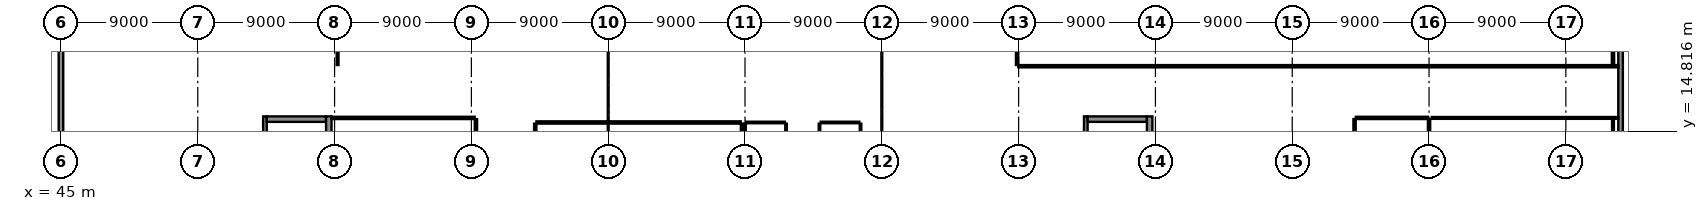
"""IFC4 building model, lengths in metres.
Left out: names, types, materials, properties, quantities, classifications, styles, units other than length and angle.
Written with IfcOpenShell. Run it as: python <this file> out.ifc"""

import sys

from ifc_helpers import new_model, si_unit, direction, frame, frame_2d, origin, place, context, subcontext, project, spatial, rectangle, extrude, element, fill, save


model = new_model("IFC4")
c1 = context("Model", 3, precision=1e-05, world=origin(), true_north=direction((0.0, 1.0)))
c2 = subcontext(c1, "Body", "Model", "MODEL_VIEW")
j1 = project(units=[si_unit("LENGTHUNIT", "METRE"), si_unit("PLANEANGLEUNIT", "RADIAN")], contexts=[c1])
p1 = place(None, origin())
s1 = spatial("IfcSite", under=j1, at=p1, CompositionType="ELEMENT")
p2 = place(p1, origin())
s2 = spatial("IfcBuilding", under=s1, at=p2, CompositionType="ELEMENT")
p3 = place(p2, frame((0.0, 0.0, 14.4)))
s3 = spatial("IfcBuildingStorey", under=s2, at=p3, CompositionType="ELEMENT", Elevation=14.4)
p4 = place(p3, frame((45.0, 23.644, 0.0), z_axis=(0.0, 0.0, 1.0), x_axis=(0.0, -1.0, 0.0)))
e1 = element("IfcWall", 1, at=p4, inside=s3, PredefinedType="SOLIDWALL", context=c2, shape_type="SweptSolid", body=[
    extrude(rectangle(XDim=11.336, YDim=0.3, at=frame_2d((5.668, 0.0))), origin(), (0.0, 0.0, 1.0), 3.685),
])
p5 = place(p4, frame((5.444, 0.0, 0.0)))
e2 = element("IfcOpeningElement", 2, at=p5, cuts=e1, PredefinedType="OPENING", context=c2, shape_type="SweptSolid", body=[
    extrude(rectangle(XDim=1.4, YDim=2.3, at=frame_2d((0.7, 1.15))), frame((0.0, 0.165, 0.0), z_axis=(0.0, -1.0, 0.0), x_axis=(1.0, 0.0, 0.0)), (0.0, 0.0, 1.0), 0.33),
])
p6 = place(p3, frame((147.6, 11.99, 0.0), z_axis=(0.0, 0.0, 1.0), x_axis=(0.0, 1.0, 0.0)))
e3 = element("IfcWall", 3, at=p6, inside=s3, PredefinedType="SOLIDWALL", context=c2, shape_type="SweptSolid", body=[
    extrude(rectangle(XDim=12.05, YDim=0.3, at=frame_2d((6.025, 0.0))), origin(), (0.0, 0.0, 1.0), 3.475),
])
p7 = place(p6, frame((1.47, 0.0, 0.85)))
e4 = element("IfcOpeningElement", 4, at=p7, cuts=e3, PredefinedType="OPENING", context=c2, shape_type="SweptSolid", body=[
    extrude(rectangle(XDim=2.0, YDim=2.0, at=frame_2d((1.0, 1.0))), frame((0.0, 0.165, 0.0), z_axis=(0.0, -1.0, 0.0), x_axis=(1.0, 0.0, 0.0)), (0.0, 0.0, 1.0), 0.33),
])
p8 = place(p6, frame((7.676, 0.0, 0.85)))
e5 = element("IfcOpeningElement", 5, at=p8, cuts=e3, PredefinedType="OPENING", context=c2, shape_type="SweptSolid", body=[
    extrude(rectangle(XDim=2.0, YDim=2.0, at=frame_2d((1.0, 1.0))), frame((0.0, 0.165, 0.0), z_axis=(0.0, -1.0, 0.0), x_axis=(1.0, 0.0, 0.0)), (0.0, 0.0, 1.0), 0.33),
])
p9 = place(p3, frame((58.42, 13.04, 0.0), z_axis=(0.0, 0.0, 1.0), x_axis=(0.0, 1.0, 0.0)))
e6 = element("IfcWall", 6, at=p9, inside=s3, PredefinedType="SHEAR", context=c2, shape_type="SweptSolid", body=[
    extrude(rectangle(XDim=2.76, YDim=0.24, at=frame_2d((1.38, 0.0))), origin(), (0.0, 0.0, 1.0), 4.16),
])
p10 = place(p3, frame((58.54, 15.62, 0.0), z_axis=(0.0, 0.0, 1.0), x_axis=(1.0, 0.0, 0.0)))
e7 = element("IfcWall", 7, at=p10, inside=s3, PredefinedType="SHEAR", context=c2, shape_type="SweptSolid", body=[
    extrude(rectangle(XDim=3.9, YDim=0.36, at=frame_2d((1.95, 0.0))), origin(), (0.0, 0.0, 1.0), 4.16),
])
p11 = place(p10, frame((1.15, 0.0, 0.0)))
e8 = element("IfcOpeningElement", 8, at=p11, cuts=e7, PredefinedType="OPENING", context=c2, shape_type="SweptSolid", body=[
    extrude(rectangle(XDim=1.6, YDim=2.25, at=frame_2d((0.8, 1.125))), frame((0.0, 0.195, 0.0), z_axis=(0.0, -1.0, 0.0), x_axis=(1.0, 0.0, 0.0)), (0.0, 0.0, 1.0), 0.39),
])
p12 = place(p3, frame((62.62, 6.76, 0.0), z_axis=(0.0, 0.0, 1.0), x_axis=(0.0, 1.0, 0.0)))
e9 = element("IfcWall", 9, at=p12, inside=s3, PredefinedType="SHEAR", context=c2, shape_type="SweptSolid", body=[
    extrude(rectangle(XDim=9.04, YDim=0.36, at=frame_2d((4.52, 0.0))), origin(), (0.0, 0.0, 1.0), 4.16),
])
p13 = place(p3, frame((112.42, 13.04, 0.0), z_axis=(0.0, 0.0, 1.0), x_axis=(0.0, 1.0, 0.0)))
e10 = element("IfcWall", 10, at=p13, inside=s3, PredefinedType="SHEAR", context=c2, shape_type="SweptSolid", body=[
    extrude(rectangle(XDim=2.76, YDim=0.24, at=frame_2d((1.38, 0.0))), origin(), (0.0, 0.0, 1.0), 4.16),
])
p14 = place(p3, frame((112.54, 15.62, 0.0), z_axis=(0.0, 0.0, 1.0), x_axis=(1.0, 0.0, 0.0)))
e11 = element("IfcWall", 11, at=p14, inside=s3, PredefinedType="SHEAR", context=c2, shape_type="SweptSolid", body=[
    extrude(rectangle(XDim=3.9, YDim=0.36, at=frame_2d((1.95, 0.0))), origin(), (0.0, 0.0, 1.0), 4.16),
])
p15 = place(p14, frame((1.15, 0.0, 0.0)))
e12 = element("IfcOpeningElement", 12, at=p15, cuts=e11, PredefinedType="OPENING", context=c2, shape_type="SweptSolid", body=[
    extrude(rectangle(XDim=1.6, YDim=2.25, at=frame_2d((0.8, 1.125))), frame((0.0, 0.195, 0.0), z_axis=(0.0, -1.0, 0.0), x_axis=(1.0, 0.0, 0.0)), (0.0, 0.0, 1.0), 0.39),
])
p16 = place(p3, frame((116.62, 6.76, 0.0), z_axis=(0.0, 0.0, 1.0), x_axis=(0.0, 1.0, 0.0)))
e13 = element("IfcWall", 13, at=p16, inside=s3, PredefinedType="SHEAR", context=c2, shape_type="SweptSolid", body=[
    extrude(rectangle(XDim=9.04, YDim=0.36, at=frame_2d((4.52, 0.0))), origin(), (0.0, 0.0, 1.0), 4.16),
])
p17 = place(p3, frame((62.795, 15.7, 0.0), z_axis=(0.0, 0.0, 1.0), x_axis=(1.0, 0.0, 0.0)))
e14 = element("IfcWall", 14, at=p17, inside=s3, PredefinedType="PARTITIONING", context=c2, shape_type="SweptSolid", body=[
    extrude(rectangle(XDim=9.425, YDim=0.15, at=frame_2d((4.712, 0.0))), origin(), (0.0, 0.0, 1.0), 4.14),
])
p18 = place(p17, frame((4.187, 0.0, 0.0)))
e15 = element("IfcOpeningElement", 15, at=p18, cuts=e14, PredefinedType="OPENING", context=c2, shape_type="SweptSolid", body=[
    extrude(rectangle(XDim=1.05, YDim=2.25, at=frame_2d((0.525, 1.125))), frame((0.0, 0.09, 0.0), z_axis=(0.0, -1.0, 0.0), x_axis=(1.0, 0.0, 0.0)), (0.0, 0.0, 1.0), 0.18),
])
p19 = place(p3, frame((72.3, 15.62, 0.0), z_axis=(0.0, 0.0, 1.0), x_axis=(0.0, -1.0, 0.0)))
e16 = element("IfcWall", 16, at=p19, inside=s3, PredefinedType="PARTITIONING", context=c2, shape_type="SweptSolid", body=[
    extrude(rectangle(XDim=3.04, YDim=0.15, at=frame_2d((1.52, 0.0))), origin(), (0.0, 0.0, 1.0), 4.14),
])
p20 = place(p3, frame((63.2, 23.52, 0.0), z_axis=(0.0, 0.0, 1.0), x_axis=(0.0, -1.0, 0.0)))
e17 = element("IfcWall", 17, at=p20, inside=s3, PredefinedType="PARTITIONING", context=c2, shape_type="SweptSolid", body=[
    extrude(rectangle(XDim=4.34, YDim=0.12, at=frame_2d((2.17, 0.0))), origin(), (0.0, 0.0, 1.0), 3.575),
])
p21 = place(p3, frame((147.1, 23.855, 0.0), z_axis=(0.0, 0.0, 1.0), x_axis=(0.0, -1.0, 0.0)))
e18 = element("IfcWall", 18, at=p21, inside=s3, PredefinedType="PARTITIONING", context=c2, shape_type="SweptSolid", body=[
    extrude(rectangle(XDim=4.675, YDim=0.15, at=frame_2d((2.337, 0.0))), origin(), (0.0, 0.0, 1.0), 4.14),
])
p22 = place(p3, frame((147.455, 19.1, 0.0), z_axis=(0.0, 0.0, 1.0), x_axis=(-1.0, 0.0, 0.0)))
e19 = element("IfcWall", 19, at=p22, inside=s3, PredefinedType="PARTITIONING", context=c2, shape_type="SweptSolid", body=[
    extrude(rectangle(XDim=39.475, YDim=0.15, at=frame_2d((19.738, 0.0))), origin(), (0.0, 0.0, 1.0), 4.14),
])
p23 = place(p22, frame((19.213, 0.0, 0.0)))
e20 = element("IfcOpeningElement", 20, at=p23, cuts=e19, PredefinedType="OPENING", context=c2, shape_type="SweptSolid", body=[
    extrude(rectangle(XDim=1.05, YDim=2.25, at=frame_2d((0.525, 1.125))), frame((0.0, 0.09, 0.0), z_axis=(0.0, -1.0, 0.0), x_axis=(1.0, 0.0, 0.0)), (0.0, 0.0, 1.0), 0.18),
])
p24 = place(p3, frame((107.9, 19.18, 0.0), z_axis=(0.0, 0.0, 1.0), x_axis=(0.0, 1.0, 0.0)))
e21 = element("IfcWall", 21, at=p24, inside=s3, PredefinedType="PARTITIONING", context=c2, shape_type="SweptSolid", body=[
    extrude(rectangle(XDim=4.497, YDim=0.15, at=frame_2d((2.249, 0.0))), origin(), (0.0, 0.0, 1.0), 3.625),
])
p25 = place(p3, frame((130.1, 11.68, 0.0), z_axis=(0.0, 0.0, 1.0), x_axis=(0.0, 1.0, 0.0)))
e22 = element("IfcWall", 22, at=p25, inside=s3, PredefinedType="PARTITIONING", context=c2, shape_type="SweptSolid", body=[
    extrude(rectangle(XDim=3.94, YDim=0.15, at=frame_2d((1.97, 0.0))), origin(), (0.0, 0.0, 1.0), 4.14),
])
p26 = place(p3, frame((130.18, 15.7, 0.0), z_axis=(0.0, 0.0, 1.0), x_axis=(1.0, 0.0, 0.0)))
e23 = element("IfcWall", 23, at=p26, inside=s3, PredefinedType="PARTITIONING", context=c2, shape_type="SweptSolid", body=[
    extrude(rectangle(XDim=4.74, YDim=0.15, at=frame_2d((2.37, 0.0))), origin(), (0.0, 0.0, 1.0), 4.14),
])
p27 = place(p26, frame((1.845, 0.0, 0.0)))
e24 = element("IfcOpeningElement", 24, at=p27, cuts=e23, PredefinedType="OPENING", context=c2, shape_type="SweptSolid", body=[
    extrude(rectangle(XDim=1.05, YDim=2.25, at=frame_2d((0.525, 1.125))), frame((0.0, 0.09, 0.0), z_axis=(0.0, -1.0, 0.0), x_axis=(1.0, 0.0, 0.0)), (0.0, 0.0, 1.0), 0.18),
])
p28 = place(p3, frame((135.0, 15.62, 0.0), z_axis=(0.0, 0.0, 1.0), x_axis=(0.0, -1.0, 0.0)))
e25 = element("IfcWall", 25, at=p28, inside=s3, PredefinedType="PARTITIONING", context=c2, shape_type="SweptSolid", body=[
    extrude(rectangle(XDim=3.94, YDim=0.15, at=frame_2d((1.97, 0.0))), origin(), (0.0, 0.0, 1.0), 3.785),
])
p29 = place(p3, frame((135.18, 15.7, 0.0), z_axis=(0.0, 0.0, 1.0), x_axis=(1.0, 0.0, 0.0)))
e26 = element("IfcWall", 26, at=p29, inside=s3, PredefinedType="PARTITIONING", context=c2, shape_type="SweptSolid", body=[
    extrude(rectangle(XDim=12.275, YDim=0.12, at=frame_2d((6.138, 0.0))), origin(), (0.0, 0.0, 1.0), 4.14),
])
p30 = place(p29, frame((5.662, 0.0, 0.0)))
e27 = element("IfcOpeningElement", 27, at=p30, cuts=e26, PredefinedType="OPENING", context=c2, shape_type="SweptSolid", body=[
    extrude(rectangle(XDim=0.95, YDim=2.15, at=frame_2d((0.475, 1.075))), frame((0.0, 0.075, 0.0), z_axis=(0.0, -1.0, 0.0), x_axis=(1.0, 0.0, 0.0)), (0.0, 0.0, 1.0), 0.15),
])
p31 = place(p3, frame((147.1, 15.645, 0.0), z_axis=(0.0, 0.0, 1.0), x_axis=(0.0, -1.0, 0.0)))
e28 = element("IfcWall", 28, at=p31, inside=s3, PredefinedType="PARTITIONING", context=c2, shape_type="SweptSolid", body=[
    extrude(rectangle(XDim=15.5, YDim=0.12, at=frame_2d((7.75, 0.0))), origin(), (0.0, 0.0, 1.0), 4.14),
])
p32 = place(p3, frame((90.08, 15.4, 0.0), z_axis=(0.0, 0.0, 1.0), x_axis=(1.0, 0.0, 0.0)))
e29 = element("IfcWall", 29, at=p32, inside=s3, PredefinedType="PARTITIONING", context=c2, shape_type="SweptSolid", body=[
    extrude(rectangle(XDim=2.54, YDim=0.1, at=frame_2d((1.27, 0.0))), origin(), (0.0, 0.0, 1.0), 4.14),
])
p33 = place(p3, frame((92.7, 15.32, 0.0), z_axis=(0.0, 0.0, 1.0), x_axis=(0.0, -1.0, 0.0)))
e30 = element("IfcWall", 30, at=p33, inside=s3, PredefinedType="PARTITIONING", context=c2, shape_type="SweptSolid", body=[
    extrude(rectangle(XDim=5.34, YDim=0.1, at=frame_2d((2.67, 0.0))), origin(), (0.0, 0.0, 1.0), 4.14),
])
p34 = place(p33, frame((2.22, 0.0, 0.0)))
e31 = element("IfcOpeningElement", 31, at=p34, cuts=e30, PredefinedType="OPENING", context=c2, shape_type="SweptSolid", body=[
    extrude(rectangle(XDim=0.9, YDim=2.05, at=frame_2d((0.45, 1.025))), frame((0.0, 0.065, 0.0), z_axis=(0.0, -1.0, 0.0), x_axis=(1.0, 0.0, 0.0)), (0.0, 0.0, 1.0), 0.13),
])
p35 = place(p3, frame((90.0, 9.98, 0.0), z_axis=(0.0, 0.0, 1.0), x_axis=(0.0, 1.0, 0.0)))
e32 = element("IfcWall", 32, at=p35, inside=s3, PredefinedType="PARTITIONING", context=c2, shape_type="SweptSolid", body=[
    extrude(rectangle(XDim=5.34, YDim=0.1, at=frame_2d((2.67, 0.0))), origin(), (0.0, 0.0, 1.0), 3.735),
])
p36 = place(p3, frame((94.98, 15.4, 0.0), z_axis=(0.0, 0.0, 1.0), x_axis=(1.0, 0.0, 0.0)))
e33 = element("IfcWall", 33, at=p36, inside=s3, PredefinedType="PARTITIONING", context=c2, shape_type="SweptSolid", body=[
    extrude(rectangle(XDim=2.54, YDim=0.1, at=frame_2d((1.27, 0.0))), origin(), (0.0, 0.0, 1.0), 4.14),
])
p37 = place(p3, frame((97.6, 15.32, 0.0), z_axis=(0.0, 0.0, 1.0), x_axis=(0.0, -1.0, 0.0)))
e34 = element("IfcWall", 34, at=p37, inside=s3, PredefinedType="PARTITIONING", context=c2, shape_type="SweptSolid", body=[
    extrude(rectangle(XDim=5.44, YDim=0.1, at=frame_2d((2.72, 0.0))), origin(), (0.0, 0.0, 1.0), 4.14),
])
p38 = place(p3, frame((94.9, 9.88, 0.0), z_axis=(0.0, 0.0, 1.0), x_axis=(0.0, 1.0, 0.0)))
e35 = element("IfcWall", 35, at=p38, inside=s3, PredefinedType="PARTITIONING", context=c2, shape_type="SweptSolid", body=[
    extrude(rectangle(XDim=5.44, YDim=0.1, at=frame_2d((2.72, 0.0))), origin(), (0.0, 0.0, 1.0), 4.14),
])
p39 = place(p38, frame((2.22, 0.0, 0.0)))
e36 = element("IfcOpeningElement", 36, at=p39, cuts=e35, PredefinedType="OPENING", context=c2, shape_type="SweptSolid", body=[
    extrude(rectangle(XDim=1.0, YDim=2.1, at=frame_2d((0.5, 1.05))), frame((0.0, 0.065, 0.0), z_axis=(0.0, -1.0, 0.0), x_axis=(1.0, 0.0, 0.0)), (0.0, 0.0, 1.0), 0.13),
])
p40 = place(p3, frame((76.2, 3.655, 0.0), z_axis=(0.0, 0.0, 1.0), x_axis=(0.0, 1.0, 0.0)))
e37 = element("IfcWall", 37, at=p40, inside=s3, PredefinedType="PARTITIONING", context=c2, shape_type="SweptSolid", body=[
    extrude(rectangle(XDim=11.665, YDim=0.15, at=frame_2d((5.833, 0.0))), origin(), (0.0, 0.0, 1.0), 4.14),
])
p41 = place(p3, frame((76.28, 15.4, 0.0), z_axis=(0.0, 0.0, 1.0), x_axis=(1.0, 0.0, 0.0)))
e38 = element("IfcWall", 38, at=p41, inside=s3, PredefinedType="PARTITIONING", context=c2, shape_type="SweptSolid", body=[
    extrude(rectangle(XDim=13.44, YDim=0.15, at=frame_2d((6.72, 0.0))), origin(), (0.0, 0.0, 1.0), 4.14),
])
p42 = place(p41, frame((6.195, 0.0, 0.0)))
e39 = element("IfcOpeningElement", 39, at=p42, cuts=e38, PredefinedType="OPENING", context=c2, shape_type="SweptSolid", body=[
    extrude(rectangle(XDim=1.05, YDim=2.25, at=frame_2d((0.525, 1.125))), frame((0.0, 0.09, 0.0), z_axis=(0.0, -1.0, 0.0), x_axis=(1.0, 0.0, 0.0)), (0.0, 0.0, 1.0), 0.18),
])
p43 = place(p3, frame((89.8, 15.32, 0.0), z_axis=(0.0, 0.0, 1.0), x_axis=(0.0, -1.0, 0.0)))
e40 = element("IfcWall", 40, at=p43, inside=s3, PredefinedType="PARTITIONING", context=c2, shape_type="SweptSolid", body=[
    extrude(rectangle(XDim=11.05, YDim=0.15, at=frame_2d((5.525, 0.0))), origin(), (0.0, 0.0, 1.0), 3.735),
])
p44 = place(p5, frame((1.4, 0.0, 0.0), z_axis=(0.0, 0.0, 1.0), x_axis=(-1.0, 0.0, 0.0)))
e41 = element("IfcDoor", 41, at=p44, inside=s3, OperationType="DOUBLE_DOOR_SINGLE_SWING", PredefinedType="DOOR", context=c2, shape_type="SweptSolid", body=[
    extrude(rectangle(XDim=1.4, YDim=2.3, at=frame_2d((0.7, 1.15))), frame((0.0, 0.025, 0.0), z_axis=(0.0, -1.0, 0.0), x_axis=(1.0, 0.0, 0.0)), (0.0, 0.0, 1.0), 0.05),
])
fill(e2, e41)
p45 = place(p7, origin())
e42 = element("IfcWindow", 42, at=p45, inside=s3, PartitioningType="SINGLE_PANEL", PredefinedType="WINDOW", context=c2, shape_type="SweptSolid", body=[
    extrude(rectangle(XDim=2.0, YDim=2.0, at=frame_2d((1.0, 1.0))), frame((0.0, 0.03, 0.0), z_axis=(0.0, -1.0, 0.0), x_axis=(1.0, 0.0, 0.0)), (0.0, 0.0, 1.0), 0.06),
])
fill(e4, e42)
p46 = place(p8, origin())
e43 = element("IfcWindow", 43, at=p46, inside=s3, PartitioningType="SINGLE_PANEL", PredefinedType="WINDOW", context=c2, shape_type="SweptSolid", body=[
    extrude(rectangle(XDim=2.0, YDim=2.0, at=frame_2d((1.0, 1.0))), frame((0.0, 0.03, 0.0), z_axis=(0.0, -1.0, 0.0), x_axis=(1.0, 0.0, 0.0)), (0.0, 0.0, 1.0), 0.06),
])
fill(e5, e43)
p47 = place(p11, origin())
e44 = element("IfcDoor", 44, at=p47, inside=s3, OperationType="DOUBLE_DOOR_SINGLE_SWING", PredefinedType="DOOR", context=c2, shape_type="SweptSolid", body=[
    extrude(rectangle(XDim=1.6, YDim=2.25, at=frame_2d((0.8, 1.125))), frame((0.0, 0.025, 0.0), z_axis=(0.0, -1.0, 0.0), x_axis=(1.0, 0.0, 0.0)), (0.0, 0.0, 1.0), 0.05),
])
fill(e8, e44)
p48 = place(p15, origin())
e45 = element("IfcDoor", 45, at=p48, inside=s3, OperationType="DOUBLE_DOOR_SINGLE_SWING", PredefinedType="DOOR", context=c2, shape_type="SweptSolid", body=[
    extrude(rectangle(XDim=1.6, YDim=2.25, at=frame_2d((0.8, 1.125))), frame((0.0, 0.025, 0.0), z_axis=(0.0, -1.0, 0.0), x_axis=(1.0, 0.0, 0.0)), (0.0, 0.0, 1.0), 0.05),
])
fill(e12, e45)
p49 = place(p18, frame((1.05, 0.0, 0.0), z_axis=(0.0, 0.0, 1.0), x_axis=(-1.0, 0.0, 0.0)))
e46 = element("IfcDoor", 46, at=p49, inside=s3, OperationType="SINGLE_SWING_LEFT", PredefinedType="DOOR", context=c2, shape_type="SweptSolid", body=[
    extrude(rectangle(XDim=1.05, YDim=2.25, at=frame_2d((0.525, 1.125))), frame((0.0, 0.025, 0.0), z_axis=(0.0, -1.0, 0.0), x_axis=(1.0, 0.0, 0.0)), (0.0, 0.0, 1.0), 0.05),
])
fill(e15, e46)
p50 = place(p23, frame((1.05, 0.0, 0.0), z_axis=(0.0, 0.0, 1.0), x_axis=(-1.0, 0.0, 0.0)))
e47 = element("IfcDoor", 47, at=p50, inside=s3, OperationType="SINGLE_SWING_LEFT", PredefinedType="DOOR", context=c2, shape_type="SweptSolid", body=[
    extrude(rectangle(XDim=1.05, YDim=2.25, at=frame_2d((0.525, 1.125))), frame((0.0, 0.025, 0.0), z_axis=(0.0, -1.0, 0.0), x_axis=(1.0, 0.0, 0.0)), (0.0, 0.0, 1.0), 0.05),
])
fill(e20, e47)
p51 = place(p27, frame((1.05, 0.0, 0.0), z_axis=(0.0, 0.0, 1.0), x_axis=(-1.0, 0.0, 0.0)))
e48 = element("IfcDoor", 48, at=p51, inside=s3, OperationType="SINGLE_SWING_LEFT", PredefinedType="DOOR", context=c2, shape_type="SweptSolid", body=[
    extrude(rectangle(XDim=1.05, YDim=2.25, at=frame_2d((0.525, 1.125))), frame((0.0, 0.025, 0.0), z_axis=(0.0, -1.0, 0.0), x_axis=(1.0, 0.0, 0.0)), (0.0, 0.0, 1.0), 0.05),
])
fill(e24, e48)
p52 = place(p30, origin())
e49 = element("IfcDoor", 49, at=p52, inside=s3, OperationType="SINGLE_SWING_RIGHT", PredefinedType="DOOR", context=c2, shape_type="SweptSolid", body=[
    extrude(rectangle(XDim=0.95, YDim=2.15, at=frame_2d((0.475, 1.075))), frame((0.0, 0.025, 0.0), z_axis=(0.0, -1.0, 0.0), x_axis=(1.0, 0.0, 0.0)), (0.0, 0.0, 1.0), 0.05),
])
fill(e27, e49)
p53 = place(p42, frame((1.05, 0.0, 0.0), z_axis=(0.0, 0.0, 1.0), x_axis=(-1.0, 0.0, 0.0)))
e50 = element("IfcDoor", 50, at=p53, inside=s3, OperationType="SINGLE_SWING_LEFT", PredefinedType="DOOR", context=c2, shape_type="SweptSolid", body=[
    extrude(rectangle(XDim=1.05, YDim=2.25, at=frame_2d((0.525, 1.125))), frame((0.0, 0.025, 0.0), z_axis=(0.0, -1.0, 0.0), x_axis=(1.0, 0.0, 0.0)), (0.0, 0.0, 1.0), 0.05),
])
fill(e39, e50)
save(model, sys.argv[1])
